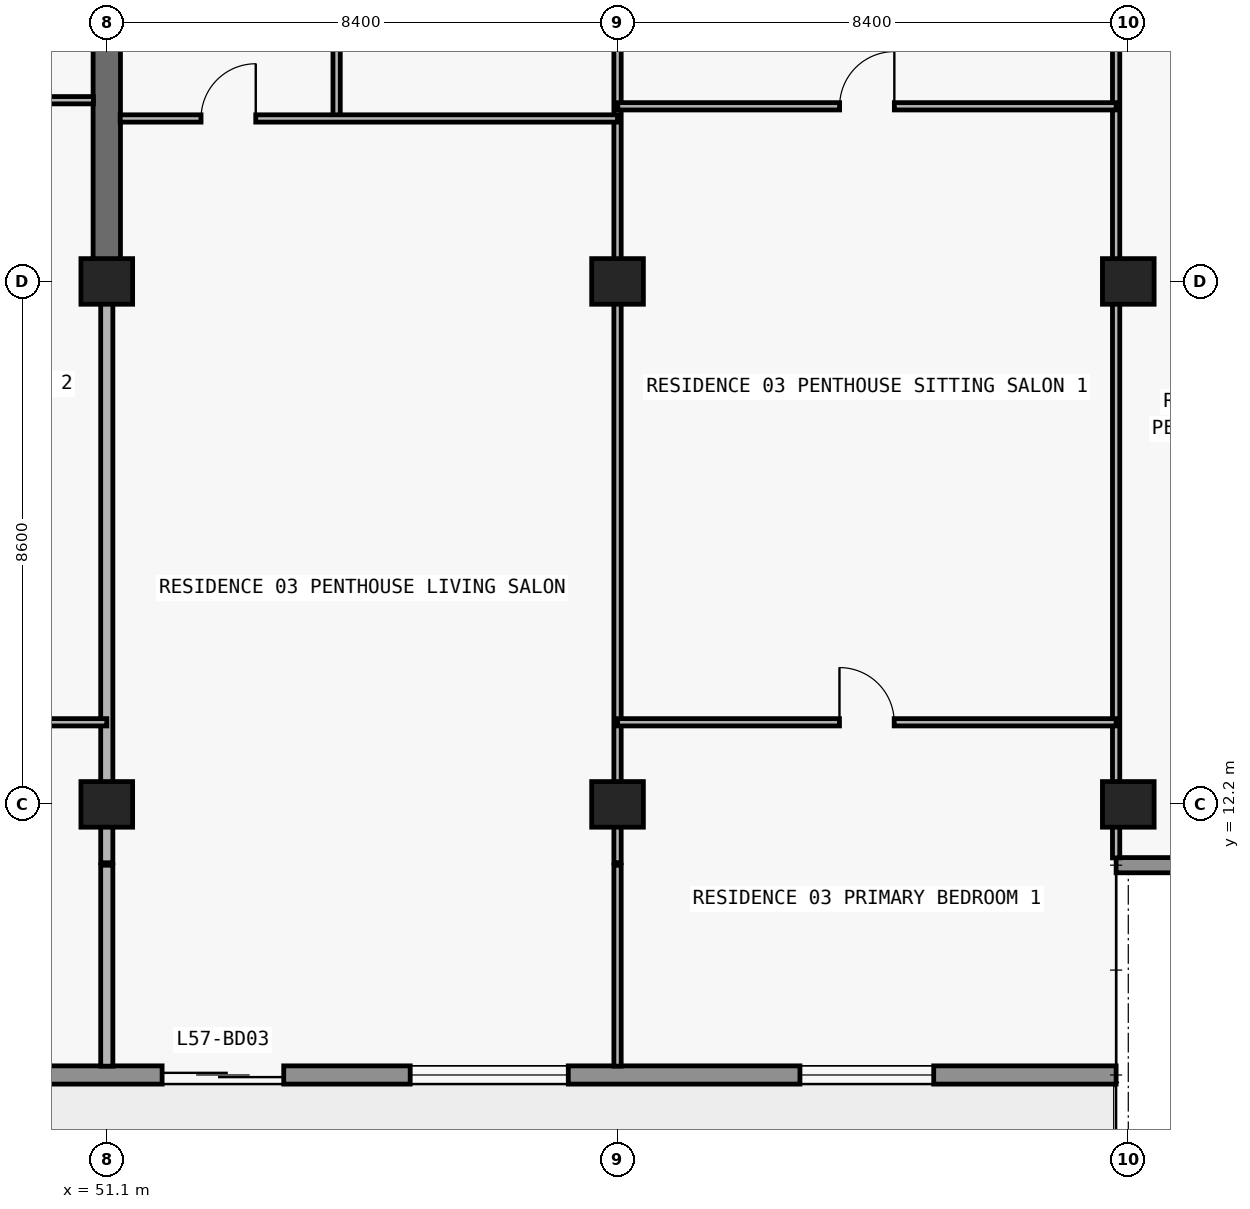
"""IFC4 building model, lengths in metres.
Left out: names, types, materials, properties, quantities, classifications, styles, units other than length and angle.
Written with IfcOpenShell. Run it as: python <this file> out.ifc"""

import sys

from ifc_helpers import new_model, si_unit, direction, frame, frame_2d, origin, origin_2d, place, context, subcontext, project, spatial, rectangle, extrude, element, fill, save


model = new_model("IFC4")
c1 = context("Model", 3, precision=1e-05, world=origin(), true_north=direction((0.0, 1.0)))
c2 = subcontext(c1, "Body", "Model", "MODEL_VIEW")
j1 = project(units=[si_unit("LENGTHUNIT", "METRE"), si_unit("PLANEANGLEUNIT", "RADIAN")], contexts=[c1])
p1 = place(None, origin())
s1 = spatial("IfcSite", under=j1, at=p1, CompositionType="ELEMENT")
p2 = place(p1, origin())
s2 = spatial("IfcBuilding", under=s1, at=p2, CompositionType="ELEMENT")
p3 = place(p2, frame((0.0, 0.0, 204.9)))
s3 = spatial("IfcBuildingStorey", under=s2, at=p3, CompositionType="ELEMENT", Elevation=204.9)
for number, where, z_axis, x_axis in (
    (1, (51.1, 12.2, 0.0), (0.0, 0.0, 1.0), (1.0, 0.0, 0.0)),
    (2, (59.5, 12.2, 0.0), (0.0, 0.0, 1.0), (1.0, 0.0, 0.0)),
    (3, (67.9, 12.2, 0.0), (0.0, 0.0, 1.0), (1.0, 0.0, 0.0)),
    (4, (51.1, 20.8, 0.0), (0.0, 0.0, 1.0), (1.0, 0.0, 0.0)),
    (5, (59.5, 20.8, 0.0), (0.0, 0.0, 1.0), (1.0, 0.0, 0.0)),
    (6, (67.9, 20.8, 0.0), (0.0, 0.0, 1.0), (1.0, 0.0, 0.0)),
):
    element("IfcColumn", number, at=place(p3, frame(where, z_axis=z_axis, x_axis=x_axis)), inside=s3, PredefinedType="COLUMN", context=c2, shape_type="SweptSolid", body=[
        extrude(rectangle(XDim=0.85, YDim=0.75, at=origin_2d()), origin(), (0.0, 0.0, 1.0), 3.05),
    ])
p4 = place(p3, frame((51.1, 20.8, 0.0), z_axis=(0.0, 0.0, 1.0), x_axis=(0.0, 1.0, 0.0)))
e7 = element("IfcWall", 7, at=p4, inside=s3, PredefinedType="SHEAR", context=c2, shape_type="SweptSolid", body=[
    extrude(rectangle(XDim=8.6, YDim=0.45, at=frame_2d((4.3, 0.0))), origin(), (0.0, 0.0, 1.0), 3.05),
])
p5 = place(p3, frame((67.7, 7.75, 0.0), z_axis=(0.0, 0.0, 1.0), x_axis=(-1.0, 0.0, 0.0)))
e8 = element("IfcWall", 8, at=p5, inside=s3, PredefinedType="STANDARD", context=c2, shape_type="SweptSolid", body=[
    extrude(rectangle(XDim=57.6, YDim=0.3, at=frame_2d((28.8, 0.0))), origin(), (0.0, 0.0, 1.0), 3.05),
])
p6 = place(p5, frame((54.69, 0.0, 0.0)))
e9 = element("IfcOpeningElement", 9, at=p6, cuts=e8, PredefinedType="OPENING", context=c2, shape_type="SweptSolid", body=[
    extrude(rectangle(XDim=2.0, YDim=2.3, at=frame_2d((1.0, 1.15))), frame((0.0, 0.16, 0.0), z_axis=(0.0, -1.0, 0.0), x_axis=(1.0, 0.0, 0.0)), (0.0, 0.0, 1.0), 0.32),
])
p7 = place(p5, frame((50.21, 0.0, 0.65)))
e10 = element("IfcOpeningElement", 10, at=p7, cuts=e8, PredefinedType="OPENING", context=c2, shape_type="SweptSolid", body=[
    extrude(rectangle(XDim=2.6, YDim=1.85, at=frame_2d((1.3, 0.925))), frame((0.0, 0.16, 0.0), z_axis=(0.0, -1.0, 0.0), x_axis=(1.0, 0.0, 0.0)), (0.0, 0.0, 1.0), 0.32),
])
p8 = place(p5, frame((44.1, 0.0, 0.85)))
e11 = element("IfcOpeningElement", 11, at=p8, cuts=e8, PredefinedType="OPENING", context=c2, shape_type="SweptSolid", body=[
    extrude(rectangle(XDim=2.2, YDim=1.55, at=frame_2d((1.1, 0.775))), frame((0.0, 0.16, 0.0), z_axis=(0.0, -1.0, 0.0), x_axis=(1.0, 0.0, 0.0)), (0.0, 0.0, 1.0), 0.32),
])
p9 = place(p5, frame((38.09, 0.0, 0.0)))
e12 = element("IfcOpeningElement", 12, at=p9, cuts=e8, PredefinedType="OPENING", context=c2, shape_type="SweptSolid", body=[
    extrude(rectangle(XDim=2.0, YDim=2.3, at=frame_2d((1.0, 1.15))), frame((0.0, 0.16, 0.0), z_axis=(0.0, -1.0, 0.0), x_axis=(1.0, 0.0, 0.0)), (0.0, 0.0, 1.0), 0.32),
])
p10 = place(p5, frame((33.41, 0.0, 0.65)))
e13 = element("IfcOpeningElement", 13, at=p10, cuts=e8, PredefinedType="OPENING", context=c2, shape_type="SweptSolid", body=[
    extrude(rectangle(XDim=2.6, YDim=1.85, at=frame_2d((1.3, 0.925))), frame((0.0, 0.16, 0.0), z_axis=(0.0, -1.0, 0.0), x_axis=(1.0, 0.0, 0.0)), (0.0, 0.0, 1.0), 0.32),
])
p11 = place(p5, frame((27.7, 0.0, 0.85)))
e14 = element("IfcOpeningElement", 14, at=p11, cuts=e8, PredefinedType="OPENING", context=c2, shape_type="SweptSolid", body=[
    extrude(rectangle(XDim=2.2, YDim=1.55, at=frame_2d((1.1, 0.775))), frame((0.0, 0.16, 0.0), z_axis=(0.0, -1.0, 0.0), x_axis=(1.0, 0.0, 0.0)), (0.0, 0.0, 1.0), 0.32),
])
p12 = place(p5, frame((19.7, 0.0, 0.85)))
e15 = element("IfcOpeningElement", 15, at=p12, cuts=e8, PredefinedType="OPENING", context=c2, shape_type="SweptSolid", body=[
    extrude(rectangle(XDim=2.2, YDim=1.55, at=frame_2d((1.1, 0.775))), frame((0.0, 0.16, 0.0), z_axis=(0.0, -1.0, 0.0), x_axis=(1.0, 0.0, 0.0)), (0.0, 0.0, 1.0), 0.32),
])
p13 = place(p5, frame((13.69, 0.0, 0.0)))
e16 = element("IfcOpeningElement", 16, at=p13, cuts=e8, PredefinedType="OPENING", context=c2, shape_type="SweptSolid", body=[
    extrude(rectangle(XDim=2.0, YDim=2.3, at=frame_2d((1.0, 1.15))), frame((0.0, 0.16, 0.0), z_axis=(0.0, -1.0, 0.0), x_axis=(1.0, 0.0, 0.0)), (0.0, 0.0, 1.0), 0.32),
])
p14 = place(p5, frame((9.01, 0.0, 0.65)))
e17 = element("IfcOpeningElement", 17, at=p14, cuts=e8, PredefinedType="OPENING", context=c2, shape_type="SweptSolid", body=[
    extrude(rectangle(XDim=2.6, YDim=1.85, at=frame_2d((1.3, 0.925))), frame((0.0, 0.16, 0.0), z_axis=(0.0, -1.0, 0.0), x_axis=(1.0, 0.0, 0.0)), (0.0, 0.0, 1.0), 0.32),
])
p15 = place(p5, frame((3.0, 0.0, 0.85)))
e18 = element("IfcOpeningElement", 18, at=p15, cuts=e8, PredefinedType="OPENING", context=c2, shape_type="SweptSolid", body=[
    extrude(rectangle(XDim=2.2, YDim=1.55, at=frame_2d((1.1, 0.775))), frame((0.0, 0.16, 0.0), z_axis=(0.0, -1.0, 0.0), x_axis=(1.0, 0.0, 0.0)), (0.0, 0.0, 1.0), 0.32),
])
p16 = place(p3, frame((67.7, 11.2, 0.0), z_axis=(0.0, 0.0, 1.0), x_axis=(1.0, 0.0, 0.0)))
e19 = element("IfcWall", 19, at=p16, inside=s3, PredefinedType="ELEMENTEDWALL", context=c2, shape_type="SweptSolid", body=[
    extrude(rectangle(XDim=3.85, YDim=0.25, at=frame_2d((1.925, 0.0))), origin(), (0.0, 0.0, 1.0), 3.05),
])
p17 = place(p3, frame((51.1, 7.895, 0.0), z_axis=(0.0, 0.0, 1.0), x_axis=(0.0, 1.0, 0.0)))
e20 = element("IfcWall", 20, at=p17, inside=s3, PredefinedType="PARTITIONING", context=c2, shape_type="SweptSolid", body=[
    extrude(rectangle(XDim=3.305, YDim=0.2, at=frame_2d((1.652, 0.0))), origin(), (0.0, 0.0, 1.0), 3.05),
])
p18 = place(p3, frame((51.1, 11.24, 0.0), z_axis=(0.0, 0.0, 1.0), x_axis=(0.0, 1.0, 0.0)))
e21 = element("IfcWall", 21, at=p18, inside=s3, PredefinedType="PARTITIONING", context=c2, shape_type="SweptSolid", body=[
    extrude(rectangle(XDim=9.555, YDim=0.2, at=frame_2d((4.777, 0.0))), origin(), (0.0, 0.0, 1.0), 2.263),
])
p19 = place(p3, frame((54.88, 23.48, 0.0), z_axis=(0.0, 0.0, 1.0), x_axis=(0.0, 1.0, 0.0)))
e22 = element("IfcWall", 22, at=p19, inside=s3, PredefinedType="PARTITIONING", context=c2, shape_type="SweptSolid", body=[
    extrude(rectangle(XDim=4.8, YDim=0.12, at=frame_2d((2.4, 0.0))), origin(), (0.0, 0.0, 1.0), 3.05),
])
p20 = place(p19, frame((1.95, 0.0, 0.0)))
e23 = element("IfcOpeningElement", 23, at=p20, cuts=e22, PredefinedType="OPENING", context=c2, shape_type="SweptSolid", body=[
    extrude(rectangle(XDim=0.9, YDim=2.15, at=frame_2d((0.45, 1.075))), frame((0.0, 0.07, 0.0), z_axis=(0.0, -1.0, 0.0), x_axis=(1.0, 0.0, 0.0)), (0.0, 0.0, 1.0), 0.14),
])
p21 = place(p3, frame((59.5, 7.895, 0.0), z_axis=(0.0, 0.0, 1.0), x_axis=(0.0, 1.0, 0.0)))
e24 = element("IfcWall", 24, at=p21, inside=s3, PredefinedType="PARTITIONING", context=c2, shape_type="SweptSolid", body=[
    extrude(rectangle(XDim=3.305, YDim=0.12, at=frame_2d((1.652, 0.0))), origin(), (0.0, 0.0, 1.0), 3.05),
])
p22 = place(p3, frame((59.5, 11.24, 0.0), z_axis=(0.0, 0.0, 1.0), x_axis=(0.0, 1.0, 0.0)))
e25 = element("IfcWall", 25, at=p22, inside=s3, PredefinedType="PARTITIONING", context=c2, shape_type="SweptSolid", body=[
    extrude(rectangle(XDim=22.76, YDim=0.12, at=frame_2d((11.38, 0.0))), origin(), (0.0, 0.0, 1.0), 2.263),
])
p23 = place(p22, frame((14.19, 0.0, 0.0)))
e26 = element("IfcOpeningElement", 26, at=p23, cuts=e25, PredefinedType="OPENING", context=c2, shape_type="SweptSolid", body=[
    extrude(rectangle(XDim=0.9, YDim=2.15, at=frame_2d((0.45, 1.075))), frame((0.0, 0.07, 0.0), z_axis=(0.0, -1.0, 0.0), x_axis=(1.0, 0.0, 0.0)), (0.0, 0.0, 1.0), 0.14),
])
p24 = place(p3, frame((67.7, 11.32, 0.0), z_axis=(0.0, 0.0, 1.0), x_axis=(0.0, 1.0, 0.0)))
e27 = element("IfcWall", 27, at=p24, inside=s3, PredefinedType="PARTITIONING", context=c2, shape_type="SweptSolid", body=[
    extrude(rectangle(XDim=22.68, YDim=0.12, at=frame_2d((11.34, 0.0))), origin(), (0.0, 0.0, 1.0), 2.263),
])
p25 = place(p24, frame((14.11, 0.0, 0.0)))
e28 = element("IfcOpeningElement", 28, at=p25, cuts=e27, PredefinedType="OPENING", context=c2, shape_type="SweptSolid", body=[
    extrude(rectangle(XDim=0.9, YDim=2.15, at=frame_2d((0.45, 1.075))), frame((0.0, 0.07, 0.0), z_axis=(0.0, -1.0, 0.0), x_axis=(1.0, 0.0, 0.0)), (0.0, 0.0, 1.0), 0.14),
])
p26 = place(p3, frame((35.1, 13.55, 0.0), z_axis=(0.0, 0.0, 1.0), x_axis=(1.0, 0.0, 0.0)))
e29 = element("IfcWall", 29, at=p26, inside=s3, PredefinedType="PARTITIONING", context=c2, shape_type="SweptSolid", body=[
    extrude(rectangle(XDim=16.0, YDim=0.12, at=frame_2d((8.0, 0.0))), origin(), (0.0, 0.0, 1.0), 3.05),
])
p27 = place(p26, frame((3.35, 0.0, 0.0)))
e30 = element("IfcOpeningElement", 30, at=p27, cuts=e29, PredefinedType="OPENING", context=c2, shape_type="SweptSolid", body=[
    extrude(rectangle(XDim=0.9, YDim=2.15, at=frame_2d((0.45, 1.075))), frame((0.0, 0.07, 0.0), z_axis=(0.0, -1.0, 0.0), x_axis=(1.0, 0.0, 0.0)), (0.0, 0.0, 1.0), 0.14),
])
p28 = place(p26, frame((11.35, 0.0, 0.0)))
e31 = element("IfcOpeningElement", 31, at=p28, cuts=e29, PredefinedType="OPENING", context=c2, shape_type="SweptSolid", body=[
    extrude(rectangle(XDim=0.9, YDim=2.15, at=frame_2d((0.45, 1.075))), frame((0.0, 0.07, 0.0), z_axis=(0.0, -1.0, 0.0), x_axis=(1.0, 0.0, 0.0)), (0.0, 0.0, 1.0), 0.14),
])
p29 = place(p3, frame((59.5, 13.55, 0.0), z_axis=(0.0, 0.0, 1.0), x_axis=(1.0, 0.0, 0.0)))
e32 = element("IfcWall", 32, at=p29, inside=s3, PredefinedType="PARTITIONING", context=c2, shape_type="SweptSolid", body=[
    extrude(rectangle(XDim=8.2, YDim=0.12, at=frame_2d((4.1, 0.0))), origin(), (0.0, 0.0, 1.0), 3.05),
])
p30 = place(p29, frame((3.65, 0.0, 0.0)))
e33 = element("IfcOpeningElement", 33, at=p30, cuts=e32, PredefinedType="OPENING", context=c2, shape_type="SweptSolid", body=[
    extrude(rectangle(XDim=0.9, YDim=2.15, at=frame_2d((0.45, 1.075))), frame((0.0, 0.07, 0.0), z_axis=(0.0, -1.0, 0.0), x_axis=(1.0, 0.0, 0.0)), (0.0, 0.0, 1.0), 0.14),
])
p31 = place(p3, frame((51.32, 23.48, 0.0), z_axis=(0.0, 0.0, 1.0), x_axis=(1.0, 0.0, 0.0)))
e34 = element("IfcWall", 34, at=p31, inside=s3, PredefinedType="PARTITIONING", context=c2, shape_type="SweptSolid", body=[
    extrude(rectangle(XDim=8.18, YDim=0.12, at=frame_2d((4.09, 0.0))), origin(), (0.0, 0.0, 1.0), 3.05),
])
p32 = place(p31, frame((1.33, 0.0, 0.0)))
e35 = element("IfcOpeningElement", 35, at=p32, cuts=e34, PredefinedType="OPENING", context=c2, shape_type="SweptSolid", body=[
    extrude(rectangle(XDim=0.9, YDim=2.15, at=frame_2d((0.45, 1.075))), frame((0.0, 0.07, 0.0), z_axis=(0.0, -1.0, 0.0), x_axis=(1.0, 0.0, 0.0)), (0.0, 0.0, 1.0), 0.14),
])
p33 = place(p3, frame((59.505, 23.68, 0.0), z_axis=(0.0, 0.0, 1.0), x_axis=(1.0, 0.0, 0.0)))
e36 = element("IfcWall", 36, at=p33, inside=s3, PredefinedType="PARTITIONING", context=c2, shape_type="SweptSolid", body=[
    extrude(rectangle(XDim=8.195, YDim=0.12, at=frame_2d((4.098, 0.0))), origin(), (0.0, 0.0, 1.0), 3.05),
])
p34 = place(p33, frame((3.647, 0.0, 0.0)))
e37 = element("IfcOpeningElement", 37, at=p34, cuts=e36, PredefinedType="OPENING", context=c2, shape_type="SweptSolid", body=[
    extrude(rectangle(XDim=0.9, YDim=2.15, at=frame_2d((0.45, 1.075))), frame((0.0, 0.07, 0.0), z_axis=(0.0, -1.0, 0.0), x_axis=(1.0, 0.0, 0.0)), (0.0, 0.0, 1.0), 0.14),
])
p35 = place(p3, frame((42.7, 23.78, 0.0), z_axis=(0.0, 0.0, 1.0), x_axis=(1.0, 0.0, 0.0)))
e38 = element("IfcWall", 38, at=p35, inside=s3, PredefinedType="PARTITIONING", context=c2, shape_type="SweptSolid", body=[
    extrude(rectangle(XDim=8.18, YDim=0.12, at=frame_2d((4.09, 0.0))), origin(), (0.0, 0.0, 1.0), 3.05),
])
p36 = place(p35, frame((3.64, 0.0, 0.0)))
e39 = element("IfcOpeningElement", 39, at=p36, cuts=e38, PredefinedType="OPENING", context=c2, shape_type="SweptSolid", body=[
    extrude(rectangle(XDim=0.9, YDim=2.15, at=frame_2d((0.45, 1.075))), frame((0.0, 0.07, 0.0), z_axis=(0.0, -1.0, 0.0), x_axis=(1.0, 0.0, 0.0)), (0.0, 0.0, 1.0), 0.14),
])
p37 = place(p13, origin())
e40 = element("IfcDoor", 40, at=p37, inside=s3, OperationType="DOUBLE_DOOR_SLIDING", PredefinedType="DOOR", context=c2, shape_type="SweptSolid", body=[
    extrude(rectangle(XDim=2.0, YDim=2.3, at=frame_2d((1.0, 1.15))), frame((0.0, 0.025, 0.0), z_axis=(0.0, -1.0, 0.0), x_axis=(1.0, 0.0, 0.0)), (0.0, 0.0, 1.0), 0.05),
])
fill(e16, e40)
p38 = place(p14, origin())
e41 = element("IfcWindow", 41, at=p38, inside=s3, PartitioningType="SINGLE_PANEL", PredefinedType="WINDOW", context=c2, shape_type="SweptSolid", body=[
    extrude(rectangle(XDim=2.6, YDim=1.85, at=frame_2d((1.3, 0.925))), frame((0.0, 0.03, 0.0), z_axis=(0.0, -1.0, 0.0), x_axis=(1.0, 0.0, 0.0)), (0.0, 0.0, 1.0), 0.06),
])
fill(e17, e41)
p39 = place(p15, origin())
e42 = element("IfcWindow", 42, at=p39, inside=s3, PartitioningType="SINGLE_PANEL", PredefinedType="WINDOW", context=c2, shape_type="SweptSolid", body=[
    extrude(rectangle(XDim=2.2, YDim=1.55, at=frame_2d((1.1, 0.775))), frame((0.0, 0.03, 0.0), z_axis=(0.0, -1.0, 0.0), x_axis=(1.0, 0.0, 0.0)), (0.0, 0.0, 1.0), 0.06),
])
fill(e18, e42)
p40 = place(p32, origin())
e43 = element("IfcDoor", 43, at=p40, inside=s3, OperationType="SINGLE_SWING_RIGHT", PredefinedType="DOOR", context=c2, shape_type="SweptSolid", body=[
    extrude(rectangle(XDim=0.9, YDim=2.15, at=frame_2d((0.45, 1.075))), frame((0.0, 0.025, 0.0), z_axis=(0.0, -1.0, 0.0), x_axis=(1.0, 0.0, 0.0)), (0.0, 0.0, 1.0), 0.05),
])
fill(e35, e43)
p41 = place(p34, origin())
e44 = element("IfcDoor", 44, at=p41, inside=s3, OperationType="SINGLE_SWING_RIGHT", PredefinedType="DOOR", context=c2, shape_type="SweptSolid", body=[
    extrude(rectangle(XDim=0.9, YDim=2.15, at=frame_2d((0.45, 1.075))), frame((0.0, 0.025, 0.0), z_axis=(0.0, -1.0, 0.0), x_axis=(1.0, 0.0, 0.0)), (0.0, 0.0, 1.0), 0.05),
])
fill(e37, e44)
p42 = place(p30, origin())
e45 = element("IfcDoor", 45, at=p42, inside=s3, OperationType="SINGLE_SWING_LEFT", PredefinedType="DOOR", context=c2, shape_type="SweptSolid", body=[
    extrude(rectangle(XDim=0.9, YDim=2.15, at=frame_2d((0.45, 1.075))), frame((0.0, 0.025, 0.0), z_axis=(0.0, -1.0, 0.0), x_axis=(1.0, 0.0, 0.0)), (0.0, 0.0, 1.0), 0.05),
])
fill(e33, e45)
save(model, sys.argv[1])
